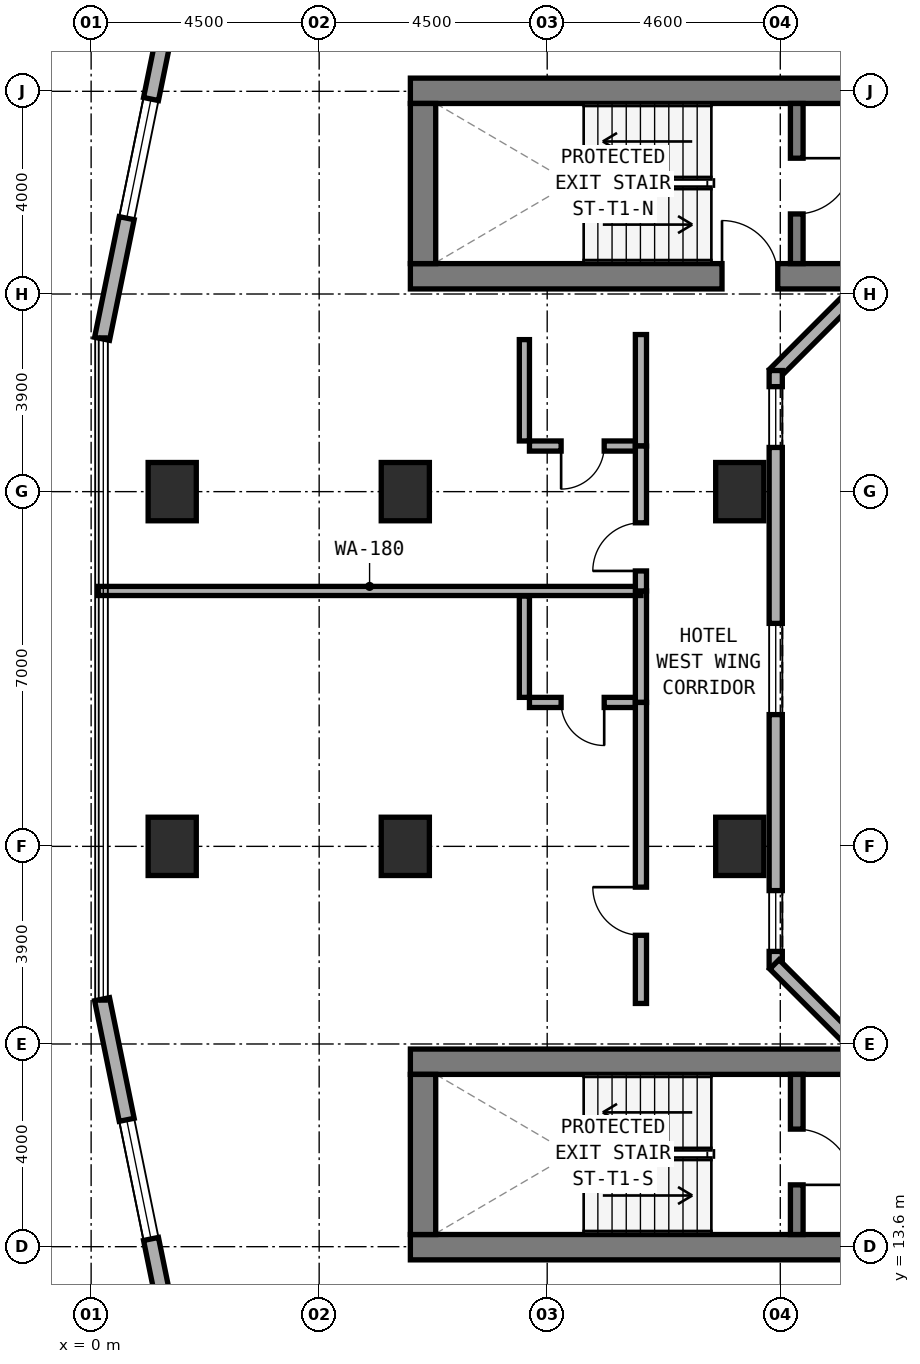
"""IFC4 building model, lengths in metres.
Left out: names, types, materials, properties, quantities, classifications, styles, units other than length and angle.
Written with IfcOpenShell. Run it as: python <this file> out.ifc"""

import sys

from ifc_helpers import new_model, si_unit, direction, frame, frame_2d, origin, origin_2d, place, context, subcontext, project, spatial, rectangle, extrude, element, fill, save


model = new_model("IFC4")
c1 = context("Model", 3, precision=1e-05, world=origin(), true_north=direction((0.0, 1.0)))
c2 = subcontext(c1, "Body", "Model", "MODEL_VIEW")
j1 = project(units=[si_unit("LENGTHUNIT", "METRE"), si_unit("PLANEANGLEUNIT", "RADIAN")], contexts=[c1])
p1 = place(None, origin())
s1 = spatial("IfcSite", under=j1, at=p1, CompositionType="ELEMENT")
p2 = place(p1, origin())
s2 = spatial("IfcBuilding", under=s1, at=p2, CompositionType="ELEMENT")
p3 = place(p2, frame((0.0, 0.0, 69.5)))
s3 = spatial("IfcBuildingStorey", under=s2, at=p3, CompositionType="ELEMENT", Elevation=69.5)
p4 = place(p3, frame((6.3, 32.75, 0.0), z_axis=(0.0, 0.0, 1.0), x_axis=(1.0, 0.0, 0.0)))
e1 = element("IfcWall", 1, at=p4, inside=s3, PredefinedType="SHEAR", context=c2, shape_type="SweptSolid", body=[
    extrude(rectangle(XDim=24.6, YDim=0.5, at=frame_2d((12.3, 0.0))), origin(), (0.0, 0.0, 1.0), 3.5),
])
p5 = place(p4, frame((6.15, 0.0, 0.0)))
e2 = element("IfcOpeningElement", 2, at=p5, cuts=e1, PredefinedType="OPENING", context=c2, shape_type="SweptSolid", body=[
    extrude(rectangle(XDim=1.1, YDim=2.15, at=frame_2d((0.55, 1.075))), frame((0.0, 0.26, 0.0), z_axis=(0.0, -1.0, 0.0), x_axis=(1.0, 0.0, 0.0)), (0.0, 0.0, 1.0), 0.52),
])
p6 = place(p3, frame((6.3, 36.41, 0.0), z_axis=(0.0, 0.0, 1.0), x_axis=(1.0, 0.0, 0.0)))
e3 = element("IfcWall", 3, at=p6, inside=s3, PredefinedType="SHEAR", context=c2, shape_type="SweptSolid", body=[
    extrude(rectangle(XDim=24.6, YDim=0.5, at=frame_2d((12.3, 0.0))), origin(), (0.0, 0.0, 1.0), 3.5),
])
p7 = place(p6, frame((9.25, 0.0, 0.0)))
e4 = element("IfcOpeningElement", 4, at=p7, cuts=e3, PredefinedType="OPENING", context=c2, shape_type="SweptSolid", body=[
    extrude(rectangle(XDim=1.2, YDim=2.15, at=frame_2d((0.6, 1.075))), frame((0.0, 0.26, 0.0), z_axis=(0.0, -1.0, 0.0), x_axis=(1.0, 0.0, 0.0)), (0.0, 0.0, 1.0), 0.52),
])
p8 = place(p6, frame((17.32, 0.0, 0.0)))
e5 = element("IfcOpeningElement", 5, at=p8, cuts=e3, PredefinedType="OPENING", context=c2, shape_type="SweptSolid", body=[
    extrude(rectangle(XDim=0.85, YDim=2.1, at=frame_2d((0.425, 1.05))), frame((0.0, 0.26, 0.0), z_axis=(0.0, -1.0, 0.0), x_axis=(1.0, 0.0, 0.0)), (0.0, 0.0, 1.0), 0.52),
])
p9 = place(p6, frame((18.883, 0.0, 0.0)))
e6 = element("IfcOpeningElement", 6, at=p9, cuts=e3, PredefinedType="OPENING", context=c2, shape_type="SweptSolid", body=[
    extrude(rectangle(XDim=1.1, YDim=2.15, at=frame_2d((0.55, 1.075))), frame((0.0, 0.26, 0.0), z_axis=(0.0, -1.0, 0.0), x_axis=(1.0, 0.0, 0.0)), (0.0, 0.0, 1.0), 0.52),
])
p10 = place(p6, frame((20.75, 0.0, 0.0)))
e7 = element("IfcOpeningElement", 7, at=p10, cuts=e3, PredefinedType="OPENING", context=c2, shape_type="SweptSolid", body=[
    extrude(rectangle(XDim=1.1, YDim=2.15, at=frame_2d((0.55, 1.075))), frame((0.0, 0.26, 0.0), z_axis=(0.0, -1.0, 0.0), x_axis=(1.0, 0.0, 0.0)), (0.0, 0.0, 1.0), 0.52),
])
p11 = place(p6, frame((22.616, 0.0, 0.0)))
e8 = element("IfcOpeningElement", 8, at=p11, cuts=e3, PredefinedType="OPENING", context=c2, shape_type="SweptSolid", body=[
    extrude(rectangle(XDim=1.1, YDim=2.15, at=frame_2d((0.55, 1.075))), frame((0.0, 0.26, 0.0), z_axis=(0.0, -1.0, 0.0), x_axis=(1.0, 0.0, 0.0)), (0.0, 0.0, 1.0), 0.52),
])
p12 = place(p3, frame((6.55, 33.0, 0.0), z_axis=(0.0, 0.0, 1.0), x_axis=(0.0, 1.0, 0.0)))
e9 = element("IfcWall", 9, at=p12, inside=s3, PredefinedType="SHEAR", context=c2, shape_type="SweptSolid", body=[
    extrude(rectangle(XDim=3.16, YDim=0.5, at=frame_2d((1.58, 0.0))), origin(), (0.0, 0.0, 1.0), 3.5),
])
p13 = place(p3, frame((13.925, 33.0, 0.0), z_axis=(0.0, 0.0, 1.0), x_axis=(0.0, 1.0, 0.0)))
e10 = element("IfcWall", 10, at=p13, inside=s3, PredefinedType="STANDARD", context=c2, shape_type="SweptSolid", body=[
    extrude(rectangle(XDim=3.16, YDim=0.25, at=frame_2d((1.58, 0.0))), origin(), (0.0, 0.0, 1.0), 3.22),
])
p14 = place(p13, frame((0.98, 0.0, 0.0)))
e11 = element("IfcOpeningElement", 11, at=p14, cuts=e10, PredefinedType="OPENING", context=c2, shape_type="SweptSolid", body=[
    extrude(rectangle(XDim=1.1, YDim=2.15, at=frame_2d((0.55, 1.075))), frame((0.0, 0.135, 0.0), z_axis=(0.0, -1.0, 0.0), x_axis=(1.0, 0.0, 0.0)), (0.0, 0.0, 1.0), 0.27),
])
p15 = place(p3, frame((6.3, 13.59, 0.0), z_axis=(0.0, 0.0, 1.0), x_axis=(1.0, 0.0, 0.0)))
e12 = element("IfcWall", 12, at=p15, inside=s3, PredefinedType="SHEAR", context=c2, shape_type="SweptSolid", body=[
    extrude(rectangle(XDim=24.6, YDim=0.5, at=frame_2d((12.3, 0.0))), origin(), (0.0, 0.0, 1.0), 3.5),
])
p16 = place(p15, frame((9.25, 0.0, 0.0)))
e13 = element("IfcOpeningElement", 13, at=p16, cuts=e12, PredefinedType="OPENING", context=c2, shape_type="SweptSolid", body=[
    extrude(rectangle(XDim=1.2, YDim=2.15, at=frame_2d((0.6, 1.075))), frame((0.0, 0.26, 0.0), z_axis=(0.0, -1.0, 0.0), x_axis=(1.0, 0.0, 0.0)), (0.0, 0.0, 1.0), 0.52),
])
p17 = place(p15, frame((17.32, 0.0, 0.0)))
e14 = element("IfcOpeningElement", 14, at=p17, cuts=e12, PredefinedType="OPENING", context=c2, shape_type="SweptSolid", body=[
    extrude(rectangle(XDim=0.85, YDim=2.1, at=frame_2d((0.425, 1.05))), frame((0.0, 0.26, 0.0), z_axis=(0.0, -1.0, 0.0), x_axis=(1.0, 0.0, 0.0)), (0.0, 0.0, 1.0), 0.52),
])
p18 = place(p3, frame((6.3, 17.25, 0.0), z_axis=(0.0, 0.0, 1.0), x_axis=(1.0, 0.0, 0.0)))
e15 = element("IfcWall", 15, at=p18, inside=s3, PredefinedType="SHEAR", context=c2, shape_type="SweptSolid", body=[
    extrude(rectangle(XDim=24.6, YDim=0.5, at=frame_2d((12.3, 0.0))), origin(), (0.0, 0.0, 1.0), 3.5),
])
p19 = place(p3, frame((6.55, 13.84, 0.0), z_axis=(0.0, 0.0, 1.0), x_axis=(0.0, 1.0, 0.0)))
e16 = element("IfcWall", 16, at=p19, inside=s3, PredefinedType="SHEAR", context=c2, shape_type="SweptSolid", body=[
    extrude(rectangle(XDim=3.16, YDim=0.5, at=frame_2d((1.58, 0.0))), origin(), (0.0, 0.0, 1.0), 3.5),
])
p20 = place(p3, frame((13.925, 13.84, 0.0), z_axis=(0.0, 0.0, 1.0), x_axis=(0.0, 1.0, 0.0)))
e17 = element("IfcWall", 17, at=p20, inside=s3, PredefinedType="STANDARD", context=c2, shape_type="SweptSolid", body=[
    extrude(rectangle(XDim=3.16, YDim=0.25, at=frame_2d((1.58, 0.0))), origin(), (0.0, 0.0, 1.0), 3.22),
])
p21 = place(p20, frame((0.98, 0.0, 0.0)))
e18 = element("IfcOpeningElement", 18, at=p21, cuts=e17, PredefinedType="OPENING", context=c2, shape_type="SweptSolid", body=[
    extrude(rectangle(XDim=1.1, YDim=2.15, at=frame_2d((0.55, 1.075))), frame((0.0, 0.135, 0.0), z_axis=(0.0, -1.0, 0.0), x_axis=(1.0, 0.0, 0.0)), (0.0, 0.0, 1.0), 0.27),
])
for number, where, z_axis, x_axis in (
    (19, (6.2, 21.5, 0.0), (0.0, 0.0, 1.0), (1.0, 0.0, 0.0)),
    (20, (6.2, 28.5, 0.0), (0.0, 0.0, 1.0), (1.0, 0.0, 0.0)),
    (21, (12.8, 21.5, 0.0), (0.0, 0.0, 1.0), (1.0, 0.0, 0.0)),
    (22, (12.8, 28.5, 0.0), (0.0, 0.0, 1.0), (1.0, 0.0, 0.0)),
    (23, (1.6, 21.5, 0.0), (0.0, 0.0, 1.0), (1.0, 0.0, 0.0)),
    (24, (1.6, 28.5, 0.0), (0.0, 0.0, 1.0), (1.0, 0.0, 0.0)),
):
    element("IfcColumn", number, at=place(p3, frame(where, z_axis=z_axis, x_axis=x_axis)), inside=s3, PredefinedType="COLUMN", context=c2, shape_type="SweptSolid", body=[
        extrude(rectangle(XDim=0.95, YDim=1.15, at=origin_2d()), origin(), (0.0, 0.0, 1.0), 3.5),
    ])
p22 = place(p3, frame((2.229, 41.378, 0.0), z_axis=(0.0, 0.0, 1.0), x_axis=(-0.199990901713, -0.979797754249, 0.0)))
e25 = element("IfcWall", 25, at=p22, inside=s3, PredefinedType="STANDARD", context=c2, shape_type="SweptSolid", body=[
    extrude(rectangle(XDim=10.065, YDim=0.3, at=frame_2d((5.033, 0.0))), origin(), (0.0, 0.0, 1.0), 3.22),
])
p23 = place(p22, frame((0.378, 0.0, 0.85)))
e26 = element("IfcOpeningElement", 26, at=p23, cuts=e25, PredefinedType="OPENING", context=c2, shape_type="SweptSolid", body=[
    extrude(rectangle(XDim=1.8, YDim=1.5, at=frame_2d((0.9, 0.75))), frame((0.0, 0.16, 0.0), z_axis=(0.0, -1.0, 0.0), x_axis=(1.0, 0.0, 0.0)), (0.0, 0.0, 1.0), 0.32),
])
p24 = place(p22, frame((5.236, 0.0, 0.8)))
e27 = element("IfcOpeningElement", 27, at=p24, cuts=e25, PredefinedType="OPENING", context=c2, shape_type="SweptSolid", body=[
    extrude(rectangle(XDim=2.4, YDim=1.6, at=frame_2d((1.2, 0.8))), frame((0.0, 0.16, 0.0), z_axis=(0.0, -1.0, 0.0), x_axis=(1.0, 0.0, 0.0)), (0.0, 0.0, 1.0), 0.32),
])
p25 = place(p3, frame((0.216, 18.484, 0.0), z_axis=(0.0, 0.0, 1.0), x_axis=(0.199990901713, -0.979797754249, 0.0)))
e28 = element("IfcWall", 28, at=p25, inside=s3, PredefinedType="STANDARD", context=c2, shape_type="SweptSolid", body=[
    extrude(rectangle(XDim=10.065, YDim=0.3, at=frame_2d((5.033, 0.0))), origin(), (0.0, 0.0, 1.0), 3.22),
])
p26 = place(p25, frame((2.429, 0.0, 0.8)))
e29 = element("IfcOpeningElement", 29, at=p26, cuts=e28, PredefinedType="OPENING", context=c2, shape_type="SweptSolid", body=[
    extrude(rectangle(XDim=2.4, YDim=1.6, at=frame_2d((1.2, 0.8))), frame((0.0, 0.16, 0.0), z_axis=(0.0, -1.0, 0.0), x_axis=(1.0, 0.0, 0.0)), (0.0, 0.0, 1.0), 0.32),
])
p27 = place(p25, frame((7.887, 0.0, 0.85)))
e30 = element("IfcOpeningElement", 30, at=p27, cuts=e28, PredefinedType="OPENING", context=c2, shape_type="SweptSolid", body=[
    extrude(rectangle(XDim=1.8, YDim=1.5, at=frame_2d((0.9, 0.75))), frame((0.0, 0.16, 0.0), z_axis=(0.0, -1.0, 0.0), x_axis=(1.0, 0.0, 0.0)), (0.0, 0.0, 1.0), 0.32),
])
p28 = place(p3, frame((15.318, 32.662, 0.0), z_axis=(0.0, 0.0, 1.0), x_axis=(-0.707106781187, -0.707106781187, 0.0)))
e31 = element("IfcWall", 31, at=p28, inside=s3, PredefinedType="STANDARD", context=c2, shape_type="SweptSolid", body=[
    extrude(rectangle(XDim=2.594, YDim=0.26, at=frame_2d((1.297, 0.0))), origin(), (0.0, 0.0, 1.0), 3.22),
])
p29 = place(p3, frame((13.51, 30.89, 0.0), z_axis=(0.0, 0.0, 1.0), x_axis=(0.0, -1.0, 0.0)))
e32 = element("IfcWall", 32, at=p29, inside=s3, PredefinedType="STANDARD", context=c2, shape_type="SweptSolid", body=[
    extrude(rectangle(XDim=11.78, YDim=0.26, at=frame_2d((5.89, 0.0))), origin(), (0.0, 0.0, 1.0), 3.22),
])
p30 = place(p29, frame((0.318, 0.0, 0.85)))
e33 = element("IfcOpeningElement", 33, at=p30, cuts=e32, PredefinedType="OPENING", context=c2, shape_type="SweptSolid", body=[
    extrude(rectangle(XDim=1.2, YDim=1.5, at=frame_2d((0.6, 0.75))), frame((0.0, 0.14, 0.0), z_axis=(0.0, -1.0, 0.0), x_axis=(1.0, 0.0, 0.0)), (0.0, 0.0, 1.0), 0.28),
])
p31 = place(p29, frame((4.99, 0.0, 0.85)))
e34 = element("IfcOpeningElement", 34, at=p31, cuts=e32, PredefinedType="OPENING", context=c2, shape_type="SweptSolid", body=[
    extrude(rectangle(XDim=1.8, YDim=1.5, at=frame_2d((0.9, 0.75))), frame((0.0, 0.14, 0.0), z_axis=(0.0, -1.0, 0.0), x_axis=(1.0, 0.0, 0.0)), (0.0, 0.0, 1.0), 0.28),
])
p32 = place(p29, frame((10.263, 0.0, 0.85)))
e35 = element("IfcOpeningElement", 35, at=p32, cuts=e32, PredefinedType="OPENING", context=c2, shape_type="SweptSolid", body=[
    extrude(rectangle(XDim=1.2, YDim=1.5, at=frame_2d((0.6, 0.75))), frame((0.0, 0.14, 0.0), z_axis=(0.0, -1.0, 0.0), x_axis=(1.0, 0.0, 0.0)), (0.0, 0.0, 1.0), 0.28),
])
p33 = place(p3, frame((13.484, 19.172, 0.0), z_axis=(0.0, 0.0, 1.0), x_axis=(0.707106781187, -0.707106781187, 0.0)))
e36 = element("IfcWall", 36, at=p33, inside=s3, PredefinedType="STANDARD", context=c2, shape_type="SweptSolid", body=[
    extrude(rectangle(XDim=2.594, YDim=0.26, at=frame_2d((1.297, 0.0))), origin(), (0.0, 0.0, 1.0), 3.22),
])
p34 = place(p3, frame((8.65, 24.34, 0.0), z_axis=(0.0, 0.0, 1.0), x_axis=(1.0, 0.0, 0.0)))
e37 = element("IfcWall", 37, at=p34, inside=s3, PredefinedType="PLUMBINGWALL", context=c2, shape_type="SweptSolid", body=[
    extrude(rectangle(XDim=2.1, YDim=0.2, at=frame_2d((1.05, 0.0))), origin(), (0.0, 0.0, 1.0), 3.22),
])
p35 = place(p34, frame((0.625, 0.0, 0.0)))
e38 = element("IfcOpeningElement", 38, at=p35, cuts=e37, PredefinedType="OPENING", context=c2, shape_type="SweptSolid", body=[
    extrude(rectangle(XDim=0.85, YDim=2.1, at=frame_2d((0.425, 1.05))), frame((0.0, 0.11, 0.0), z_axis=(0.0, -1.0, 0.0), x_axis=(1.0, 0.0, 0.0)), (0.0, 0.0, 1.0), 0.22),
])
p36 = place(p3, frame((8.55, 24.44, 0.0), z_axis=(0.0, 0.0, 1.0), x_axis=(0.0, 1.0, 0.0)))
e39 = element("IfcWall", 39, at=p36, inside=s3, PredefinedType="PLUMBINGWALL", context=c2, shape_type="SweptSolid", body=[
    extrude(rectangle(XDim=2.0, YDim=0.2, at=frame_2d((1.0, 0.0))), origin(), (0.0, 0.0, 1.0), 3.22),
])
p37 = place(p3, frame((10.85, 24.34, 0.0), z_axis=(0.0, 0.0, 1.0), x_axis=(0.0, 1.0, 0.0)))
e40 = element("IfcWall", 40, at=p37, inside=s3, PredefinedType="SOLIDWALL", context=c2, shape_type="SweptSolid", body=[
    extrude(rectangle(XDim=2.2, YDim=0.22, at=frame_2d((1.1, 0.0))), origin(), (0.0, 0.0, 1.0), 3.22),
])
p38 = place(p3, frame((10.85, 18.4, 0.0), z_axis=(0.0, 0.0, 1.0), x_axis=(0.0, 1.0, 0.0)))
e41 = element("IfcWall", 41, at=p38, inside=s3, PredefinedType="SOLIDWALL", context=c2, shape_type="SweptSolid", body=[
    extrude(rectangle(XDim=5.94, YDim=0.22, at=frame_2d((2.97, 0.0))), origin(), (0.0, 0.0, 1.0), 2.495),
])
p39 = place(p38, frame((1.345, 0.0, 0.0)))
e42 = element("IfcOpeningElement", 42, at=p39, cuts=e41, PredefinedType="OPENING", context=c2, shape_type="SweptSolid", body=[
    extrude(rectangle(XDim=0.95, YDim=2.1, at=frame_2d((0.475, 1.05))), frame((0.0, 0.12, 0.0), z_axis=(0.0, -1.0, 0.0), x_axis=(1.0, 0.0, 0.0)), (0.0, 0.0, 1.0), 0.24),
])
p40 = place(p3, frame((0.14, 26.54, 0.0), z_axis=(0.0, 0.0, 1.0), x_axis=(1.0, 0.0, 0.0)))
e43 = element("IfcWall", 43, at=p40, inside=s3, PredefinedType="SOLIDWALL", context=c2, shape_type="SweptSolid", body=[
    extrude(rectangle(XDim=10.71, YDim=0.18, at=frame_2d((5.355, 0.0))), origin(), (0.0, 0.0, 1.0), 2.745),
])
p41 = place(p3, frame((8.65, 29.4, 0.0), z_axis=(0.0, 0.0, 1.0), x_axis=(1.0, 0.0, 0.0)))
e44 = element("IfcWall", 44, at=p41, inside=s3, PredefinedType="PLUMBINGWALL", context=c2, shape_type="SweptSolid", body=[
    extrude(rectangle(XDim=2.1, YDim=0.2, at=frame_2d((1.05, 0.0))), origin(), (0.0, 0.0, 1.0), 3.22),
])
p42 = place(p41, frame((0.625, 0.0, 0.0)))
e45 = element("IfcOpeningElement", 45, at=p42, cuts=e44, PredefinedType="OPENING", context=c2, shape_type="SweptSolid", body=[
    extrude(rectangle(XDim=0.85, YDim=2.1, at=frame_2d((0.425, 1.05))), frame((0.0, 0.11, 0.0), z_axis=(0.0, -1.0, 0.0), x_axis=(1.0, 0.0, 0.0)), (0.0, 0.0, 1.0), 0.22),
])
p43 = place(p3, frame((8.55, 29.5, 0.0), z_axis=(0.0, 0.0, 1.0), x_axis=(0.0, 1.0, 0.0)))
e46 = element("IfcWall", 46, at=p43, inside=s3, PredefinedType="PLUMBINGWALL", context=c2, shape_type="SweptSolid", body=[
    extrude(rectangle(XDim=2.0, YDim=0.2, at=frame_2d((1.0, 0.0))), origin(), (0.0, 0.0, 1.0), 3.22),
])
p44 = place(p3, frame((10.85, 29.4, 0.0), z_axis=(0.0, 0.0, 1.0), x_axis=(0.0, 1.0, 0.0)))
e47 = element("IfcWall", 47, at=p44, inside=s3, PredefinedType="SOLIDWALL", context=c2, shape_type="SweptSolid", body=[
    extrude(rectangle(XDim=2.2, YDim=0.22, at=frame_2d((1.1, 0.0))), origin(), (0.0, 0.0, 1.0), 3.22),
])
p45 = place(p3, frame((10.85, 26.54, 0.0), z_axis=(0.0, 0.0, 1.0), x_axis=(0.0, 1.0, 0.0)))
e48 = element("IfcWall", 48, at=p45, inside=s3, PredefinedType="SOLIDWALL", context=c2, shape_type="SweptSolid", body=[
    extrude(rectangle(XDim=2.86, YDim=0.22, at=frame_2d((1.43, 0.0))), origin(), (0.0, 0.0, 1.0), 2.495),
])
p46 = place(p45, frame((0.395, 0.0, 0.0)))
e49 = element("IfcOpeningElement", 49, at=p46, cuts=e48, PredefinedType="OPENING", context=c2, shape_type="SweptSolid", body=[
    extrude(rectangle(XDim=0.95, YDim=2.1, at=frame_2d((0.475, 1.05))), frame((0.0, 0.12, 0.0), z_axis=(0.0, -1.0, 0.0), x_axis=(1.0, 0.0, 0.0)), (0.0, 0.0, 1.0), 0.24),
])
p47 = place(p24, origin())
e50 = element("IfcWindow", 50, at=p47, inside=s3, PartitioningType="SINGLE_PANEL", PredefinedType="WINDOW", context=c2, shape_type="SweptSolid", body=[
    extrude(rectangle(XDim=2.4, YDim=1.6, at=frame_2d((1.2, 0.8))), frame((0.0, 0.03, 0.0), z_axis=(0.0, -1.0, 0.0), x_axis=(1.0, 0.0, 0.0)), (0.0, 0.0, 1.0), 0.06),
])
fill(e27, e50)
p48 = place(p26, origin())
e51 = element("IfcWindow", 51, at=p48, inside=s3, PartitioningType="SINGLE_PANEL", PredefinedType="WINDOW", context=c2, shape_type="SweptSolid", body=[
    extrude(rectangle(XDim=2.4, YDim=1.6, at=frame_2d((1.2, 0.8))), frame((0.0, 0.03, 0.0), z_axis=(0.0, -1.0, 0.0), x_axis=(1.0, 0.0, 0.0)), (0.0, 0.0, 1.0), 0.06),
])
fill(e29, e51)
p49 = place(p30, origin())
e52 = element("IfcWindow", 52, at=p49, inside=s3, PartitioningType="SINGLE_PANEL", PredefinedType="WINDOW", context=c2, shape_type="SweptSolid", body=[
    extrude(rectangle(XDim=1.2, YDim=1.5, at=frame_2d((0.6, 0.75))), frame((0.0, 0.03, 0.0), z_axis=(0.0, -1.0, 0.0), x_axis=(1.0, 0.0, 0.0)), (0.0, 0.0, 1.0), 0.06),
])
fill(e33, e52)
p50 = place(p31, origin())
e53 = element("IfcWindow", 53, at=p50, inside=s3, PartitioningType="SINGLE_PANEL", PredefinedType="WINDOW", context=c2, shape_type="SweptSolid", body=[
    extrude(rectangle(XDim=1.8, YDim=1.5, at=frame_2d((0.9, 0.75))), frame((0.0, 0.03, 0.0), z_axis=(0.0, -1.0, 0.0), x_axis=(1.0, 0.0, 0.0)), (0.0, 0.0, 1.0), 0.06),
])
fill(e34, e53)
p51 = place(p32, origin())
e54 = element("IfcWindow", 54, at=p51, inside=s3, PartitioningType="SINGLE_PANEL", PredefinedType="WINDOW", context=c2, shape_type="SweptSolid", body=[
    extrude(rectangle(XDim=1.2, YDim=1.5, at=frame_2d((0.6, 0.75))), frame((0.0, 0.03, 0.0), z_axis=(0.0, -1.0, 0.0), x_axis=(1.0, 0.0, 0.0)), (0.0, 0.0, 1.0), 0.06),
])
fill(e35, e54)
p52 = place(p14, frame((1.1, 0.0, 0.0), z_axis=(0.0, 0.0, 1.0), x_axis=(-1.0, 0.0, 0.0)))
e55 = element("IfcDoor", 55, at=p52, inside=s3, OperationType="SINGLE_SWING_LEFT", PredefinedType="DOOR", context=c2, shape_type="SweptSolid", body=[
    extrude(rectangle(XDim=1.1, YDim=2.15, at=frame_2d((0.55, 1.075))), frame((0.0, 0.025, 0.0), z_axis=(0.0, -1.0, 0.0), x_axis=(1.0, 0.0, 0.0)), (0.0, 0.0, 1.0), 0.05),
])
fill(e11, e55)
p53 = place(p21, frame((1.1, 0.0, 0.0), z_axis=(0.0, 0.0, 1.0), x_axis=(-1.0, 0.0, 0.0)))
e56 = element("IfcDoor", 56, at=p53, inside=s3, OperationType="SINGLE_SWING_RIGHT", PredefinedType="DOOR", context=c2, shape_type="SweptSolid", body=[
    extrude(rectangle(XDim=1.1, YDim=2.15, at=frame_2d((0.55, 1.075))), frame((0.0, 0.025, 0.0), z_axis=(0.0, -1.0, 0.0), x_axis=(1.0, 0.0, 0.0)), (0.0, 0.0, 1.0), 0.05),
])
fill(e18, e56)
p54 = place(p5, origin())
e57 = element("IfcDoor", 57, at=p54, inside=s3, OperationType="SINGLE_SWING_LEFT", PredefinedType="DOOR", context=c2, shape_type="SweptSolid", body=[
    extrude(rectangle(XDim=1.1, YDim=2.15, at=frame_2d((0.55, 1.075))), frame((0.0, 0.025, 0.0), z_axis=(0.0, -1.0, 0.0), x_axis=(1.0, 0.0, 0.0)), (0.0, 0.0, 1.0), 0.05),
])
fill(e2, e57)
p55 = place(p35, frame((0.85, 0.0, 0.0), z_axis=(0.0, 0.0, 1.0), x_axis=(-1.0, 0.0, 0.0)))
e58 = element("IfcDoor", 58, at=p55, inside=s3, OperationType="SINGLE_SWING_LEFT", PredefinedType="DOOR", context=c2, shape_type="SweptSolid", body=[
    extrude(rectangle(XDim=0.85, YDim=2.1, at=frame_2d((0.425, 1.05))), frame((0.0, 0.025, 0.0), z_axis=(0.0, -1.0, 0.0), x_axis=(1.0, 0.0, 0.0)), (0.0, 0.0, 1.0), 0.05),
])
fill(e38, e58)
p56 = place(p39, origin())
e59 = element("IfcDoor", 59, at=p56, inside=s3, OperationType="SINGLE_SWING_RIGHT", PredefinedType="DOOR", context=c2, shape_type="SweptSolid", body=[
    extrude(rectangle(XDim=0.95, YDim=2.1, at=frame_2d((0.475, 1.05))), frame((0.0, 0.025, 0.0), z_axis=(0.0, -1.0, 0.0), x_axis=(1.0, 0.0, 0.0)), (0.0, 0.0, 1.0), 0.05),
])
fill(e42, e59)
p57 = place(p42, frame((0.85, 0.0, 0.0), z_axis=(0.0, 0.0, 1.0), x_axis=(-1.0, 0.0, 0.0)))
e60 = element("IfcDoor", 60, at=p57, inside=s3, OperationType="SINGLE_SWING_RIGHT", PredefinedType="DOOR", context=c2, shape_type="SweptSolid", body=[
    extrude(rectangle(XDim=0.85, YDim=2.1, at=frame_2d((0.425, 1.05))), frame((0.0, 0.025, 0.0), z_axis=(0.0, -1.0, 0.0), x_axis=(1.0, 0.0, 0.0)), (0.0, 0.0, 1.0), 0.05),
])
fill(e45, e60)
p58 = place(p46, origin())
e61 = element("IfcDoor", 61, at=p58, inside=s3, OperationType="SINGLE_SWING_LEFT", PredefinedType="DOOR", context=c2, shape_type="SweptSolid", body=[
    extrude(rectangle(XDim=0.95, YDim=2.1, at=frame_2d((0.475, 1.05))), frame((0.0, 0.025, 0.0), z_axis=(0.0, -1.0, 0.0), x_axis=(1.0, 0.0, 0.0)), (0.0, 0.0, 1.0), 0.05),
])
fill(e49, e61)
save(model, sys.argv[1])
